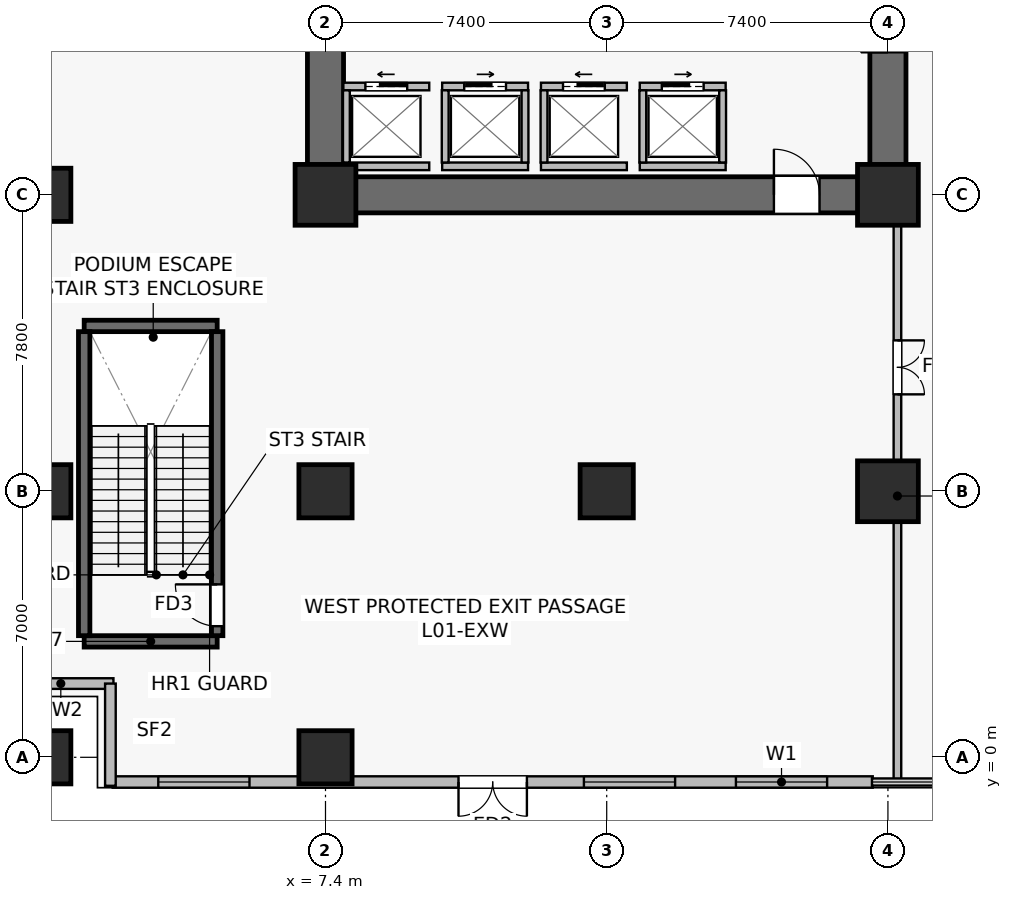
"""IFC4 building model, lengths in metres.
Left out: names, types, materials, properties, quantities, classifications, styles, units other than length and angle.
Written with IfcOpenShell. Run it as: python <this file> out.ifc"""

import sys

from ifc_helpers import new_model, si_unit, direction, frame, frame_2d, origin, origin_2d, place, context, subcontext, project, spatial, rectangle, extrude, source, transform, mapped, element, fill, save


model = new_model("IFC4")
c1 = context("Model", 3, precision=1e-05, world=origin(), true_north=direction((0.0, 1.0)))
c2 = subcontext(c1, "Body", "Model", "MODEL_VIEW")
j1 = project(units=[si_unit("LENGTHUNIT", "METRE"), si_unit("PLANEANGLEUNIT", "RADIAN")], contexts=[c1])
p1 = place(None, origin())
s1 = spatial("IfcSite", under=j1, at=p1, CompositionType="ELEMENT")
p2 = place(p1, origin())
s2 = spatial("IfcBuilding", under=s1, at=p2, CompositionType="ELEMENT")
p3 = place(p2, origin())
s3 = spatial("IfcBuildingStorey", under=s2, at=p3, CompositionType="ELEMENT", Elevation=0.0)
p4 = place(p3, frame((6.925, 14.8, 0.0), z_axis=(0.0, 0.0, 1.0), x_axis=(1.0, 0.0, 0.0)))
e1 = element("IfcWall", 1, at=p4, inside=s3, PredefinedType="SHEAR", context=c2, shape_type="SweptSolid", body=[
    extrude(rectangle(XDim=15.75, YDim=0.95, at=frame_2d((7.875, 0.0))), origin(), (0.0, 0.0, 1.0), 5.05),
])
p5 = place(p4, frame((12.275, 0.0, 0.0)))
e2 = element("IfcOpeningElement", 2, at=p5, cuts=e1, PredefinedType="OPENING", context=c2, shape_type="SweptSolid", body=[
    extrude(rectangle(XDim=1.2, YDim=2.16, at=frame_2d((0.6, 1.08))), frame((0.0, 0.485, 0.0), z_axis=(0.0, -1.0, 0.0), x_axis=(1.0, 0.0, 0.0)), (0.0, 0.0, 1.0), 0.97),
])
p6 = place(p3, frame((7.4, 15.275, 0.0), z_axis=(0.0, 0.0, 1.0), x_axis=(0.0, 1.0, 0.0)))
e3 = element("IfcWall", 3, at=p6, inside=s3, PredefinedType="SHEAR", context=c2, shape_type="SweptSolid", body=[
    extrude(rectangle(XDim=18.05, YDim=0.95, at=frame_2d((9.025, 0.0))), origin(), (0.0, 0.0, 1.0), 5.05),
])
p7 = place(p3, frame((22.2, 15.275, 0.0), z_axis=(0.0, 0.0, 1.0), x_axis=(0.0, 1.0, 0.0)))
e4 = element("IfcWall", 4, at=p7, inside=s3, PredefinedType="SHEAR", context=c2, shape_type="SweptSolid", body=[
    extrude(rectangle(XDim=18.05, YDim=0.95, at=frame_2d((9.025, 0.0))), origin(), (0.0, 0.0, 1.0), 5.05),
])
p8 = place(p7, frame((3.275, 0.0, 0.0)))
e5 = element("IfcOpeningElement", 5, at=p8, cuts=e4, PredefinedType="OPENING", context=c2, shape_type="SweptSolid", body=[
    extrude(rectangle(XDim=1.42, YDim=2.2, at=frame_2d((0.71, 1.1))), frame((0.0, 0.485, 0.0), z_axis=(0.0, -1.0, 0.0), x_axis=(1.0, 0.0, 0.0)), (0.0, 0.0, 1.0), 0.97),
])
for number, where, z_axis, x_axis in (
    (6, (1.05, 3.05, 0.0), (0.0, 0.0, 1.0), (1.0, 0.0, 0.0)),
    (7, (1.05, 11.35, 0.0), (0.0, 0.0, 1.0), (1.0, 0.0, 0.0)),
):
    element("IfcWall", number, at=place(p3, frame(where, z_axis=z_axis, x_axis=x_axis)), inside=s3, PredefinedType="SHEAR", context=c2, shape_type="SweptSolid", body=[
        extrude(rectangle(XDim=3.5, YDim=0.3, at=frame_2d((1.75, 0.0))), origin(), (0.0, 0.0, 1.0), 5.05),
    ])
p9 = place(p3, frame((1.05, 3.2, 0.0), z_axis=(0.0, 0.0, 1.0), x_axis=(0.0, 1.0, 0.0)))
e8 = element("IfcWall", 8, at=p9, inside=s3, PredefinedType="SHEAR", context=c2, shape_type="SweptSolid", body=[
    extrude(rectangle(XDim=8.0, YDim=0.3, at=frame_2d((4.0, 0.0))), origin(), (0.0, 0.0, 1.0), 5.05),
])
p10 = place(p3, frame((4.55, 3.2, 0.0), z_axis=(0.0, 0.0, 1.0), x_axis=(0.0, 1.0, 0.0)))
e9 = element("IfcWall", 9, at=p10, inside=s3, PredefinedType="SHEAR", context=c2, shape_type="SweptSolid", body=[
    extrude(rectangle(XDim=8.0, YDim=0.3, at=frame_2d((4.0, 0.0))), origin(), (0.0, 0.0, 1.0), 5.05),
])
p11 = place(p10, frame((0.25, 0.0, 0.0)))
e10 = element("IfcOpeningElement", 10, at=p11, cuts=e9, PredefinedType="OPENING", context=c2, shape_type="SweptSolid", body=[
    extrude(rectangle(XDim=1.1, YDim=2.15, at=frame_2d((0.55, 1.075))), frame((0.0, 0.16, 0.0), z_axis=(0.0, -1.0, 0.0), x_axis=(1.0, 0.0, 0.0)), (0.0, 0.0, 1.0), 0.32),
])
m1 = source(origin(), c2, "Body", "SweptSolid", [
    extrude(rectangle(XDim=1.4, YDim=1.4, at=origin_2d()), origin(), (0.0, 0.0, 1.0), 5.4),
])
p12 = place(p3, frame((14.8, 7.0, 0.0), z_axis=(0.0, 0.0, 1.0), x_axis=(1.0, 0.0, 0.0)))
e11 = element("IfcColumn", 11, at=p12, inside=s3, PredefinedType="COLUMN", context=c2, shape_type="MappedRepresentation", body=[
    mapped(m1, transform((0.0, 0.0, 0.0), scale=1.0)),
])
m2 = source(origin(), c2, "Body", "SweptSolid", [
    extrude(rectangle(XDim=1.6, YDim=1.6, at=origin_2d()), origin(), (0.0, 0.0, 1.0), 5.4),
])
for number, where, z_axis, x_axis in (
    (12, (22.2, 7.0, 0.0), (0.0, 0.0, 1.0), (1.0, 0.0, 0.0)),
    (13, (7.4, 14.8, 0.0), (0.0, 0.0, 1.0), (1.0, 0.0, 0.0)),
    (14, (22.2, 14.8, 0.0), (0.0, 0.0, 1.0), (1.0, 0.0, 0.0)),
):
    element("IfcColumn", number, at=place(p3, frame(where, z_axis=z_axis, x_axis=x_axis)), inside=s3, PredefinedType="COLUMN", context=c2, shape_type="MappedRepresentation", body=[
        mapped(m2, transform((0.0, 0.0, 0.0), scale=1.0)),
    ])
for number, where, z_axis, x_axis in (
    (15, (7.4, 7.0, 0.0), (0.0, 0.0, 1.0), (1.0, 0.0, 0.0)),
    (16, (0.0, 7.0, 0.0), (0.0, 0.0, 1.0), (1.0, 0.0, 0.0)),
    (17, (0.0, 14.8, 0.0), (0.0, 0.0, 1.0), (1.0, 0.0, 0.0)),
    (18, (0.0, 0.0, 0.0), (0.0, 0.0, 1.0), (1.0, 0.0, 0.0)),
    (19, (7.4, 0.0, 0.0), (0.0, 0.0, 1.0), (1.0, 0.0, 0.0)),
):
    element("IfcColumn", number, at=place(p3, frame(where, z_axis=z_axis, x_axis=x_axis)), inside=s3, PredefinedType="COLUMN", context=c2, shape_type="MappedRepresentation", body=[
        mapped(m1, transform((0.0, 0.0, 0.0), scale=1.0)),
    ])
p13 = place(p3, frame((21.8, -0.65, 0.0), z_axis=(0.0, 0.0, 1.0), x_axis=(-1.0, 0.0, 0.0)))
e20 = element("IfcWall", 20, at=p13, inside=s3, PredefinedType="STANDARD", context=c2, shape_type="SweptSolid", body=[
    extrude(rectangle(XDim=20.0, YDim=0.3, at=frame_2d((10.0, 0.0))), origin(), (0.0, 0.0, 1.0), 5.05),
])
p14 = place(p13, frame((9.1, 0.0, 0.0)))
e21 = element("IfcOpeningElement", 21, at=p14, cuts=e20, PredefinedType="OPENING", context=c2, shape_type="SweptSolid", body=[
    extrude(rectangle(XDim=1.8, YDim=2.3, at=frame_2d((0.9, 1.15))), frame((0.0, 0.16, 0.0), z_axis=(0.0, -1.0, 0.0), x_axis=(1.0, 0.0, 0.0)), (0.0, 0.0, 1.0), 0.32),
])
p15 = place(p13, frame((1.2, 0.0, 0.9)))
e22 = element("IfcOpeningElement", 22, at=p15, cuts=e20, PredefinedType="OPENING", context=c2, shape_type="SweptSolid", body=[
    extrude(rectangle(XDim=2.4, YDim=2.8, at=frame_2d((1.2, 1.4))), frame((0.0, 0.16, 0.0), z_axis=(0.0, -1.0, 0.0), x_axis=(1.0, 0.0, 0.0)), (0.0, 0.0, 1.0), 0.32),
])
p16 = place(p13, frame((5.2, 0.0, 0.9)))
e23 = element("IfcOpeningElement", 23, at=p16, cuts=e20, PredefinedType="OPENING", context=c2, shape_type="SweptSolid", body=[
    extrude(rectangle(XDim=2.4, YDim=2.8, at=frame_2d((1.2, 1.4))), frame((0.0, 0.16, 0.0), z_axis=(0.0, -1.0, 0.0), x_axis=(1.0, 0.0, 0.0)), (0.0, 0.0, 1.0), 0.32),
])
p17 = place(p13, frame((16.4, 0.0, 0.9)))
e24 = element("IfcOpeningElement", 24, at=p17, cuts=e20, PredefinedType="OPENING", context=c2, shape_type="SweptSolid", body=[
    extrude(rectangle(XDim=2.4, YDim=2.8, at=frame_2d((1.2, 1.4))), frame((0.0, 0.16, 0.0), z_axis=(0.0, -1.0, 0.0), x_axis=(1.0, 0.0, 0.0)), (0.0, 0.0, 1.0), 0.32),
])
p18 = place(p3, frame((-0.95, 1.94, 0.0), z_axis=(0.0, 0.0, 1.0), x_axis=(1.0, 0.0, 0.0)))
e25 = element("IfcWall", 25, at=p18, inside=s3, PredefinedType="STANDARD", context=c2, shape_type="SweptSolid", body=[
    extrude(rectangle(XDim=2.77, YDim=0.28, at=frame_2d((1.385, 0.0))), origin(), (0.0, 0.0, 1.0), 5.05),
])
p19 = place(p3, frame((1.74, 1.94, 0.0), z_axis=(0.0, 0.0, 1.0), x_axis=(0.0, -1.0, 0.0)))
e26 = element("IfcWall", 26, at=p19, inside=s3, PredefinedType="STANDARD", context=c2, shape_type="SweptSolid", body=[
    extrude(rectangle(XDim=2.69, YDim=0.28, at=frame_2d((1.345, 0.0))), origin(), (0.0, 0.0, 1.0), 5.05),
])
p20 = place(p3, frame((7.87, 17.65, 0.0), z_axis=(0.0, 0.0, 1.0), x_axis=(1.0, 0.0, 0.0)))
e27 = element("IfcWall", 27, at=p20, inside=s3, PredefinedType="SOLIDWALL", context=c2, shape_type="SweptSolid", body=[
    extrude(rectangle(XDim=2.26, YDim=0.2, at=frame_2d((1.13, 0.0))), origin(), (0.0, 0.0, 1.0), 5.05),
])
p21 = place(p20, frame((0.58, 0.0, 0.0)))
e28 = element("IfcOpeningElement", 28, at=p21, cuts=e27, PredefinedType="OPENING", context=c2, shape_type="SweptSolid", body=[
    extrude(rectangle(XDim=1.1, YDim=2.22, at=frame_2d((0.55, 1.11))), frame((0.0, 0.11, 0.0), z_axis=(0.0, -1.0, 0.0), x_axis=(1.0, 0.0, 0.0)), (0.0, 0.0, 1.0), 0.22),
])
p22 = place(p3, frame((7.87, 15.55, 0.0), z_axis=(0.0, 0.0, 1.0), x_axis=(1.0, 0.0, 0.0)))
e29 = element("IfcWall", 29, at=p22, inside=s3, PredefinedType="SOLIDWALL", context=c2, shape_type="SweptSolid", body=[
    extrude(rectangle(XDim=2.26, YDim=0.2, at=frame_2d((1.13, 0.0))), origin(), (0.0, 0.0, 1.0), 5.05),
])
p23 = place(p3, frame((7.95, 15.65, 0.0), z_axis=(0.0, 0.0, 1.0), x_axis=(0.0, 1.0, 0.0)))
e30 = element("IfcWall", 30, at=p23, inside=s3, PredefinedType="SOLIDWALL", context=c2, shape_type="SweptSolid", body=[
    extrude(rectangle(XDim=1.9, YDim=0.18, at=frame_2d((0.95, 0.0))), origin(), (0.0, 0.0, 1.0), 5.05),
])
p24 = place(p3, frame((10.47, 17.65, 0.0), z_axis=(0.0, 0.0, 1.0), x_axis=(1.0, 0.0, 0.0)))
e31 = element("IfcWall", 31, at=p24, inside=s3, PredefinedType="SOLIDWALL", context=c2, shape_type="SweptSolid", body=[
    extrude(rectangle(XDim=2.26, YDim=0.2, at=frame_2d((1.13, 0.0))), origin(), (0.0, 0.0, 1.0), 5.05),
])
p25 = place(p24, frame((0.58, 0.0, 0.0)))
e32 = element("IfcOpeningElement", 32, at=p25, cuts=e31, PredefinedType="OPENING", context=c2, shape_type="SweptSolid", body=[
    extrude(rectangle(XDim=1.1, YDim=2.22, at=frame_2d((0.55, 1.11))), frame((0.0, 0.11, 0.0), z_axis=(0.0, -1.0, 0.0), x_axis=(1.0, 0.0, 0.0)), (0.0, 0.0, 1.0), 0.22),
])
p26 = place(p3, frame((10.47, 15.55, 0.0), z_axis=(0.0, 0.0, 1.0), x_axis=(1.0, 0.0, 0.0)))
e33 = element("IfcWall", 33, at=p26, inside=s3, PredefinedType="SOLIDWALL", context=c2, shape_type="SweptSolid", body=[
    extrude(rectangle(XDim=2.26, YDim=0.2, at=frame_2d((1.13, 0.0))), origin(), (0.0, 0.0, 1.0), 5.05),
])
for number, where, z_axis, x_axis in (
    (34, (10.55, 15.65, 0.0), (0.0, 0.0, 1.0), (0.0, 1.0, 0.0)),
    (35, (12.65, 15.65, 0.0), (0.0, 0.0, 1.0), (0.0, 1.0, 0.0)),
):
    element("IfcWall", number, at=place(p3, frame(where, z_axis=z_axis, x_axis=x_axis)), inside=s3, PredefinedType="SOLIDWALL", context=c2, shape_type="SweptSolid", body=[
        extrude(rectangle(XDim=1.9, YDim=0.18, at=frame_2d((0.95, 0.0))), origin(), (0.0, 0.0, 1.0), 5.05),
    ])
p27 = place(p3, frame((13.07, 17.65, 0.0), z_axis=(0.0, 0.0, 1.0), x_axis=(1.0, 0.0, 0.0)))
e36 = element("IfcWall", 36, at=p27, inside=s3, PredefinedType="SOLIDWALL", context=c2, shape_type="SweptSolid", body=[
    extrude(rectangle(XDim=2.26, YDim=0.2, at=frame_2d((1.13, 0.0))), origin(), (0.0, 0.0, 1.0), 4.335),
])
p28 = place(p27, frame((0.58, 0.0, 0.0)))
e37 = element("IfcOpeningElement", 37, at=p28, cuts=e36, PredefinedType="OPENING", context=c2, shape_type="SweptSolid", body=[
    extrude(rectangle(XDim=1.1, YDim=2.22, at=frame_2d((0.55, 1.11))), frame((0.0, 0.11, 0.0), z_axis=(0.0, -1.0, 0.0), x_axis=(1.0, 0.0, 0.0)), (0.0, 0.0, 1.0), 0.22),
])
p29 = place(p3, frame((13.07, 15.55, 0.0), z_axis=(0.0, 0.0, 1.0), x_axis=(1.0, 0.0, 0.0)))
e38 = element("IfcWall", 38, at=p29, inside=s3, PredefinedType="SOLIDWALL", context=c2, shape_type="SweptSolid", body=[
    extrude(rectangle(XDim=2.26, YDim=0.2, at=frame_2d((1.13, 0.0))), origin(), (0.0, 0.0, 1.0), 4.335),
])
p30 = place(p3, frame((13.15, 15.65, 0.0), z_axis=(0.0, 0.0, 1.0), x_axis=(0.0, 1.0, 0.0)))
e39 = element("IfcWall", 39, at=p30, inside=s3, PredefinedType="SOLIDWALL", context=c2, shape_type="SweptSolid", body=[
    extrude(rectangle(XDim=1.9, YDim=0.18, at=frame_2d((0.95, 0.0))), origin(), (0.0, 0.0, 1.0), 5.05),
])
p31 = place(p3, frame((15.67, 17.65, 0.0), z_axis=(0.0, 0.0, 1.0), x_axis=(1.0, 0.0, 0.0)))
e40 = element("IfcWall", 40, at=p31, inside=s3, PredefinedType="SOLIDWALL", context=c2, shape_type="SweptSolid", body=[
    extrude(rectangle(XDim=2.26, YDim=0.2, at=frame_2d((1.13, 0.0))), origin(), (0.0, 0.0, 1.0), 5.05),
])
p32 = place(p31, frame((0.58, 0.0, 0.0)))
e41 = element("IfcOpeningElement", 41, at=p32, cuts=e40, PredefinedType="OPENING", context=c2, shape_type="SweptSolid", body=[
    extrude(rectangle(XDim=1.1, YDim=2.22, at=frame_2d((0.55, 1.11))), frame((0.0, 0.11, 0.0), z_axis=(0.0, -1.0, 0.0), x_axis=(1.0, 0.0, 0.0)), (0.0, 0.0, 1.0), 0.22),
])
p33 = place(p3, frame((15.67, 15.55, 0.0), z_axis=(0.0, 0.0, 1.0), x_axis=(1.0, 0.0, 0.0)))
e42 = element("IfcWall", 42, at=p33, inside=s3, PredefinedType="SOLIDWALL", context=c2, shape_type="SweptSolid", body=[
    extrude(rectangle(XDim=2.26, YDim=0.2, at=frame_2d((1.13, 0.0))), origin(), (0.0, 0.0, 1.0), 5.05),
])
for number, where, z_axis, x_axis in (
    (43, (15.75, 15.65, 0.0), (0.0, 0.0, 1.0), (0.0, 1.0, 0.0)),
    (44, (17.85, 15.65, 0.0), (0.0, 0.0, 1.0), (0.0, 1.0, 0.0)),
):
    element("IfcWall", number, at=place(p3, frame(where, z_axis=z_axis, x_axis=x_axis)), inside=s3, PredefinedType="SOLIDWALL", context=c2, shape_type="SweptSolid", body=[
        extrude(rectangle(XDim=1.9, YDim=0.18, at=frame_2d((0.95, 0.0))), origin(), (0.0, 0.0, 1.0), 5.05),
    ])
p34 = place(p3, frame((22.45, 14.4, 0.0), z_axis=(0.0, 0.0, 1.0), x_axis=(0.0, -1.0, 0.0)))
e45 = element("IfcWall", 45, at=p34, inside=s3, PredefinedType="SOLIDWALL", context=c2, shape_type="SweptSolid", body=[
    extrude(rectangle(XDim=15.05, YDim=0.2, at=frame_2d((7.525, 0.0))), origin(), (0.0, 0.0, 1.0), 4.335),
])
p35 = place(p34, frame((3.43, 0.0, 0.0)))
e46 = element("IfcOpeningElement", 46, at=p35, cuts=e45, PredefinedType="OPENING", context=c2, shape_type="SweptSolid", body=[
    extrude(rectangle(XDim=1.42, YDim=2.2, at=frame_2d((0.71, 1.1))), frame((0.0, 0.11, 0.0), z_axis=(0.0, -1.0, 0.0), x_axis=(1.0, 0.0, 0.0)), (0.0, 0.0, 1.0), 0.22),
])
m3 = source(origin(), c2, "Body", "SweptSolid", [
    extrude(rectangle(XDim=1.8, YDim=2.3, at=frame_2d((0.9, 1.15))), frame((0.0, 0.025, 0.0), z_axis=(0.0, -1.0, 0.0), x_axis=(1.0, 0.0, 0.0)), (0.0, 0.0, 1.0), 0.05),
])
p36 = place(p14, origin())
e47 = element("IfcDoor", 47, at=p36, inside=s3, OperationType="DOUBLE_DOOR_SINGLE_SWING", PredefinedType="DOOR", context=c2, shape_type="MappedRepresentation", body=[
    mapped(m3, transform((0.0, 0.0, 0.0), scale=1.0)),
])
fill(e21, e47)
m4 = source(origin(), c2, "Body", "SweptSolid", [
    extrude(rectangle(XDim=2.4, YDim=2.8, at=frame_2d((1.2, 1.4))), frame((0.0, 0.03, 0.0), z_axis=(0.0, -1.0, 0.0), x_axis=(1.0, 0.0, 0.0)), (0.0, 0.0, 1.0), 0.06),
])
p37 = place(p15, origin())
e48 = element("IfcWindow", 48, at=p37, inside=s3, PartitioningType="SINGLE_PANEL", PredefinedType="WINDOW", context=c2, shape_type="MappedRepresentation", body=[
    mapped(m4, transform((0.0, 0.0, 0.0), scale=1.0)),
])
fill(e22, e48)
p38 = place(p16, origin())
e49 = element("IfcWindow", 49, at=p38, inside=s3, PartitioningType="SINGLE_PANEL", PredefinedType="WINDOW", context=c2, shape_type="MappedRepresentation", body=[
    mapped(m4, transform((0.0, 0.0, 0.0), scale=1.0)),
])
fill(e23, e49)
p39 = place(p17, origin())
e50 = element("IfcWindow", 50, at=p39, inside=s3, PartitioningType="SINGLE_PANEL", PredefinedType="WINDOW", context=c2, shape_type="MappedRepresentation", body=[
    mapped(m4, transform((0.0, 0.0, 0.0), scale=1.0)),
])
fill(e24, e50)
m5 = source(origin(), c2, "Body", "SweptSolid", [
    extrude(rectangle(XDim=1.1, YDim=2.22, at=frame_2d((0.55, 1.11))), frame((0.0, 0.025, 0.0), z_axis=(0.0, -1.0, 0.0), x_axis=(1.0, 0.0, 0.0)), (0.0, 0.0, 1.0), 0.05),
])
p40 = place(p21, origin())
e51 = element("IfcDoor", 51, at=p40, inside=s3, OperationType="SLIDING_TO_LEFT", PredefinedType="USERDEFINED", context=c2, shape_type="MappedRepresentation", body=[
    mapped(m5, transform((0.0, 0.0, 0.0), scale=1.0)),
])
fill(e28, e51)
p41 = place(p25, origin())
e52 = element("IfcDoor", 52, at=p41, inside=s3, OperationType="SLIDING_TO_RIGHT", PredefinedType="USERDEFINED", context=c2, shape_type="MappedRepresentation", body=[
    mapped(m5, transform((0.0, 0.0, 0.0), scale=1.0)),
])
fill(e32, e52)
p42 = place(p28, origin())
e53 = element("IfcDoor", 53, at=p42, inside=s3, OperationType="SLIDING_TO_LEFT", PredefinedType="USERDEFINED", context=c2, shape_type="MappedRepresentation", body=[
    mapped(m5, transform((0.0, 0.0, 0.0), scale=1.0)),
])
fill(e37, e53)
p43 = place(p32, origin())
e54 = element("IfcDoor", 54, at=p43, inside=s3, OperationType="SLIDING_TO_RIGHT", PredefinedType="USERDEFINED", context=c2, shape_type="MappedRepresentation", body=[
    mapped(m5, transform((0.0, 0.0, 0.0), scale=1.0)),
])
fill(e41, e54)
m6 = source(origin(), c2, "Body", "SweptSolid", [
    extrude(rectangle(XDim=1.2, YDim=2.16, at=frame_2d((0.6, 1.08))), frame((0.0, 0.025, 0.0), z_axis=(0.0, -1.0, 0.0), x_axis=(1.0, 0.0, 0.0)), (0.0, 0.0, 1.0), 0.05),
])
p44 = place(p5, origin())
e55 = element("IfcDoor", 55, at=p44, inside=s3, OperationType="SINGLE_SWING_LEFT", PredefinedType="DOOR", context=c2, shape_type="MappedRepresentation", body=[
    mapped(m6, transform((0.0, 0.0, 0.0), scale=1.0)),
])
fill(e2, e55)
m7 = source(origin(), c2, "Body", "SweptSolid", [
    extrude(rectangle(XDim=1.42, YDim=2.2, at=frame_2d((0.71, 1.1))), frame((0.0, 0.025, 0.0), z_axis=(0.0, -1.0, 0.0), x_axis=(1.0, 0.0, 0.0)), (0.0, 0.0, 1.0), 0.05),
])
p45 = place(p8, origin())
e56 = element("IfcDoor", 56, at=p45, inside=s3, OperationType="DOUBLE_DOOR_SINGLE_SWING", PredefinedType="DOOR", context=c2, shape_type="MappedRepresentation", body=[
    mapped(m7, transform((0.0, 0.0, 0.0), scale=1.0)),
])
fill(e5, e56)
m8 = source(origin(), c2, "Body", "SweptSolid", [
    extrude(rectangle(XDim=1.1, YDim=2.15, at=frame_2d((0.55, 1.075))), frame((0.0, 0.025, 0.0), z_axis=(0.0, -1.0, 0.0), x_axis=(1.0, 0.0, 0.0)), (0.0, 0.0, 1.0), 0.05),
])
p46 = place(p11, origin())
e57 = element("IfcDoor", 57, at=p46, inside=s3, OperationType="SINGLE_SWING_RIGHT", PredefinedType="DOOR", context=c2, shape_type="MappedRepresentation", body=[
    mapped(m8, transform((0.0, 0.0, 0.0), scale=1.0)),
])
fill(e10, e57)
p47 = place(p35, origin())
e58 = element("IfcDoor", 58, at=p47, inside=s3, OperationType="DOUBLE_DOOR_SINGLE_SWING", PredefinedType="DOOR", context=c2, shape_type="MappedRepresentation", body=[
    mapped(m7, transform((0.0, 0.0, 0.0), scale=1.0)),
])
fill(e46, e58)
save(model, sys.argv[1])
